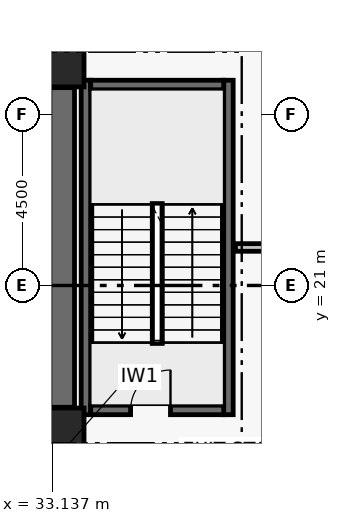
"""IFC4 building model, lengths in metres.
Left out: names, types, materials, properties, quantities, classifications, styles, units other than length and angle.
Written with IfcOpenShell. Run it as: python <this file> out.ifc"""

import sys

from ifc_helpers import new_model, si_unit, direction, frame, frame_2d, origin, origin_2d, place, context, subcontext, project, spatial, rectangle, extrude, element, fill, save


model = new_model("IFC4")
c1 = context("Model", 3, precision=1e-05, world=origin(), true_north=direction((0.0, 1.0)))
c2 = subcontext(c1, "Body", "Model", "MODEL_VIEW")
j1 = project(units=[si_unit("LENGTHUNIT", "METRE"), si_unit("PLANEANGLEUNIT", "RADIAN")], contexts=[c1])
p1 = place(None, origin())
s1 = spatial("IfcSite", under=j1, at=p1, CompositionType="ELEMENT")
p2 = place(p1, origin())
s2 = spatial("IfcBuilding", under=s1, at=p2, CompositionType="ELEMENT")
p3 = place(p2, origin())
s3 = spatial("IfcBuildingStorey", under=s2, at=p3, CompositionType="ELEMENT", Elevation=0.0)
for number, where, z_axis, x_axis in (
    (1, (33.4, 17.2, 0.0), (0.0, 0.0, 1.0), (1.0, 0.0, 0.0)),
    (2, (33.4, 26.8, 0.0), (0.0, 0.0, 1.0), (1.0, 0.0, 0.0)),
):
    element("IfcColumn", number, at=place(p3, frame(where, z_axis=z_axis, x_axis=x_axis)), inside=s3, PredefinedType="COLUMN", context=c2, shape_type="SweptSolid", body=[
        extrude(rectangle(XDim=1.15, YDim=1.15, at=origin_2d()), origin(), (0.0, 0.0, 1.0), 7.2),
    ])
p4 = place(p3, frame((33.4, 17.795, 0.0), z_axis=(0.0, 0.0, 1.0), x_axis=(0.0, 1.0, 0.0)))
e3 = element("IfcWall", 3, at=p4, inside=s3, PredefinedType="SHEAR", context=c2, shape_type="SweptSolid", body=[
    extrude(rectangle(XDim=8.41, YDim=0.65, at=frame_2d((4.205, 0.0))), origin(), (0.0, 0.0, 1.0), 6.88),
])
for number, where, z_axis, x_axis in (
    (4, (34.025, 17.6, 0.0), (0.0, 0.0, 1.0), (0.0, 1.0, 0.0)),
    (5, (37.775, 17.6, 0.0), (0.0, 0.0, 1.0), (0.0, 1.0, 0.0)),
):
    element("IfcWall", number, at=place(p3, frame(where, z_axis=z_axis, x_axis=x_axis)), inside=s3, PredefinedType="SHEAR", context=c2, shape_type="SweptSolid", body=[
        extrude(rectangle(XDim=8.8, YDim=0.25, at=frame_2d((4.4, 0.0))), origin(), (0.0, 0.0, 1.0), 6.88),
    ])
p5 = place(p3, frame((34.15, 17.725, 0.0), z_axis=(0.0, 0.0, 1.0), x_axis=(1.0, 0.0, 0.0)))
e6 = element("IfcWall", 6, at=p5, inside=s3, PredefinedType="SHEAR", context=c2, shape_type="SweptSolid", body=[
    extrude(rectangle(XDim=3.5, YDim=0.25, at=frame_2d((1.75, 0.0))), origin(), (0.0, 0.0, 1.0), 6.88),
])
p6 = place(p5, frame((1.05, 0.0, 0.0)))
e7 = element("IfcOpeningElement", 7, at=p6, cuts=e6, PredefinedType="OPENING", context=c2, shape_type="SweptSolid", body=[
    extrude(rectangle(XDim=1.05, YDim=2.08, at=frame_2d((0.525, 1.04))), frame((0.0, 0.135, 0.0), z_axis=(0.0, -1.0, 0.0), x_axis=(1.0, 0.0, 0.0)), (0.0, 0.0, 1.0), 0.27),
])
p7 = place(p3, frame((34.15, 26.275, 0.0), z_axis=(0.0, 0.0, 1.0), x_axis=(1.0, 0.0, 0.0)))
e8 = element("IfcWall", 8, at=p7, inside=s3, PredefinedType="SHEAR", context=c2, shape_type="SweptSolid", body=[
    extrude(rectangle(XDim=3.5, YDim=0.25, at=frame_2d((1.75, 0.0))), origin(), (0.0, 0.0, 1.0), 6.88),
])
p8 = place(p3, frame((37.982, 28.304, 0.0), z_axis=(0.0, 0.0, 1.0), x_axis=(0.769753796379, -0.638340890873, 0.0)))
e9 = element("IfcWall", 9, at=p8, inside=s3, PredefinedType="PARTITIONING", context=c2, shape_type="SweptSolid", body=[
    extrude(rectangle(XDim=6.324, YDim=0.26, at=frame_2d((3.162, 0.0))), origin(), (0.0, 0.0, 1.0), 5.43),
])
p9 = place(p8, frame((2.278, 0.0, 0.9)))
e10 = element("IfcOpeningElement", 10, at=p9, cuts=e9, PredefinedType="OPENING", context=c2, shape_type="SweptSolid", body=[
    extrude(rectangle(XDim=1.8, YDim=1.5, at=frame_2d((0.9, 0.75))), frame((0.0, 0.14, 0.0), z_axis=(0.0, -1.0, 0.0), x_axis=(1.0, 0.0, 0.0)), (0.0, 0.0, 1.0), 0.28),
])
p10 = place(p3, frame((42.85, 19.733, 0.0), z_axis=(0.0, 0.0, 1.0), x_axis=(-0.769753796379, -0.638340890873, 0.0)))
e11 = element("IfcWall", 11, at=p10, inside=s3, PredefinedType="PARTITIONING", context=c2, shape_type="SweptSolid", body=[
    extrude(rectangle(XDim=6.324, YDim=0.26, at=frame_2d((3.162, 0.0))), origin(), (0.0, 0.0, 1.0), 5.43),
])
p11 = place(p10, frame((2.246, 0.0, 0.9)))
e12 = element("IfcOpeningElement", 12, at=p11, cuts=e11, PredefinedType="OPENING", context=c2, shape_type="SweptSolid", body=[
    extrude(rectangle(XDim=1.8, YDim=1.5, at=frame_2d((0.9, 0.75))), frame((0.0, 0.14, 0.0), z_axis=(0.0, -1.0, 0.0), x_axis=(1.0, 0.0, 0.0)), (0.0, 0.0, 1.0), 0.28),
])
for number, where, z_axis, x_axis in (
    (13, (32.88, 16.78, 0.0), (0.0, 0.0, 1.0), (1.0, 0.0, 0.0)),
    (14, (33.74, 27.22, 0.0), (0.0, 0.0, 1.0), (-1.0, 0.0, 0.0)),
):
    element("IfcWall", number, at=place(p3, frame(where, z_axis=z_axis, x_axis=x_axis)), inside=s3, PredefinedType="PARTITIONING", context=c2, shape_type="SweptSolid", body=[
        extrude(rectangle(XDim=0.86, YDim=0.2, at=frame_2d((0.43, 0.0))), origin(), (0.0, 0.0, 1.0), 5.46),
    ])
p12 = place(p3, frame((37.96, 22.0, 0.0), z_axis=(0.0, 0.0, 1.0), x_axis=(1.0, 0.0, 0.0)))
e15 = element("IfcWall", 15, at=p12, inside=s3, PredefinedType="PARTITIONING", context=c2, shape_type="SweptSolid", body=[
    extrude(rectangle(XDim=7.125, YDim=0.2, at=frame_2d((3.562, 0.0))), origin(), (0.0, 0.0, 1.0), 6.88),
])
p13 = place(p6, origin())
e16 = element("IfcDoor", 16, at=p13, inside=s3, OperationType="SINGLE_SWING_RIGHT", PredefinedType="DOOR", context=c2, shape_type="SweptSolid", body=[
    extrude(rectangle(XDim=1.05, YDim=2.08, at=frame_2d((0.525, 1.04))), frame((0.0, 0.025, 0.0), z_axis=(0.0, -1.0, 0.0), x_axis=(1.0, 0.0, 0.0)), (0.0, 0.0, 1.0), 0.05),
])
fill(e7, e16)
save(model, sys.argv[1])
